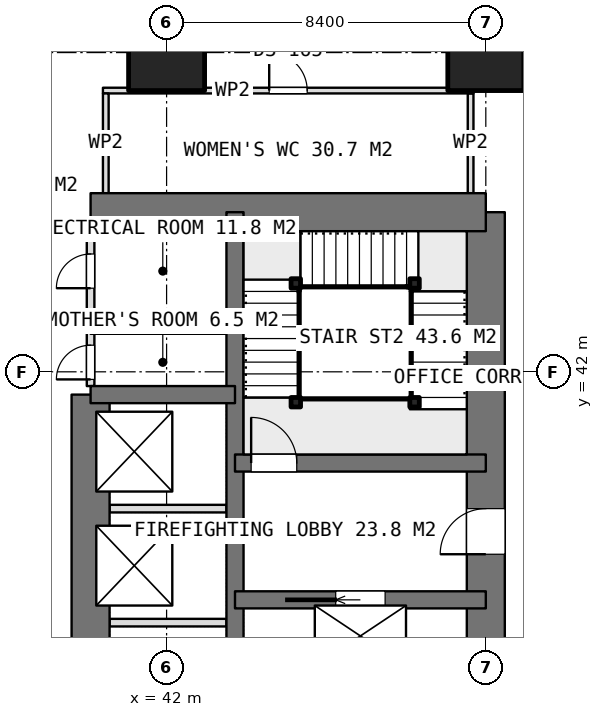
"""IFC4 building model, lengths in metres.
Left out: names, types, materials, properties, quantities, classifications, styles, units other than length and angle.
Written with IfcOpenShell. Run it as: python <this file> out.ifc"""

import sys

from ifc_helpers import new_model, si_unit, direction, frame, frame_2d, origin, origin_2d, place, context, subcontext, project, spatial, rectangle, extrude, element, fill, save


model = new_model("IFC4")
c1 = context("Model", 3, precision=1e-05, world=origin(), true_north=direction((0.0, 1.0)))
c2 = subcontext(c1, "Body", "Model", "MODEL_VIEW")
j1 = project(units=[si_unit("LENGTHUNIT", "METRE"), si_unit("PLANEANGLEUNIT", "RADIAN")], contexts=[c1])
p1 = place(None, origin())
s1 = spatial("IfcSite", under=j1, at=p1, CompositionType="ELEMENT")
p2 = place(p1, origin())
s2 = spatial("IfcBuilding", under=s1, at=p2, CompositionType="ELEMENT")
p3 = place(p2, frame((0.0, 0.0, 151.55)))
s3 = spatial("IfcBuildingStorey", under=s2, at=p3, CompositionType="ELEMENT", Elevation=151.55)
p4 = place(p3, frame((40.0, 46.2, 0.0), z_axis=(0.0, 0.0, 1.0), x_axis=(1.0, 0.0, 0.0)))
e1 = element("IfcWall", 1, at=p4, inside=s3, PredefinedType="SHEAR", context=c2, shape_type="SweptSolid", body=[
    extrude(rectangle(XDim=10.4, YDim=1.0, at=frame_2d((5.2, 0.0))), origin(), (0.0, 0.0, 1.0), 3.75),
])
p5 = place(p3, frame((50.4, 21.0, 0.0), z_axis=(0.0, 0.0, 1.0), x_axis=(0.0, 1.0, 0.0)))
e2 = element("IfcWall", 2, at=p5, inside=s3, PredefinedType="SHEAR", context=c2, shape_type="SweptSolid", body=[
    extrude(rectangle(XDim=25.2, YDim=1.0, at=frame_2d((12.6, 0.0))), origin(), (0.0, 0.0, 1.0), 3.75),
])
p6 = place(p5, frame((16.2, 0.0, 0.0)))
e3 = element("IfcOpeningElement", 3, at=p6, cuts=e2, PredefinedType="OPENING", context=c2, shape_type="SweptSolid", body=[
    extrude(rectangle(XDim=1.2, YDim=2.1, at=frame_2d((0.6, 1.05))), frame((0.0, 0.51, 0.0), z_axis=(0.0, -1.0, 0.0), x_axis=(1.0, 0.0, 0.0)), (0.0, 0.0, 1.0), 1.02),
])
p7 = place(p5, frame((10.05, 0.0, 0.0)))
e4 = element("IfcOpeningElement", 4, at=p7, cuts=e2, PredefinedType="OPENING", context=c2, shape_type="SweptSolid", body=[
    extrude(rectangle(XDim=0.9, YDim=2.1, at=frame_2d((0.45, 1.05))), frame((0.0, 0.51, 0.0), z_axis=(0.0, -1.0, 0.0), x_axis=(1.0, 0.0, 0.0)), (0.0, 0.0, 1.0), 1.02),
])
p8 = place(p5, frame((7.45, 0.0, 0.0)))
e5 = element("IfcOpeningElement", 5, at=p8, cuts=e2, PredefinedType="OPENING", context=c2, shape_type="SweptSolid", body=[
    extrude(rectangle(XDim=0.9, YDim=2.1, at=frame_2d((0.45, 1.05))), frame((0.0, 0.51, 0.0), z_axis=(0.0, -1.0, 0.0), x_axis=(1.0, 0.0, 0.0)), (0.0, 0.0, 1.0), 1.02),
])
p9 = place(p5, frame((0.7, 0.0, 0.0)))
e6 = element("IfcOpeningElement", 6, at=p9, cuts=e2, PredefinedType="OPENING", context=c2, shape_type="SweptSolid", body=[
    extrude(rectangle(XDim=1.2, YDim=2.1, at=frame_2d((0.6, 1.05))), frame((0.0, 0.51, 0.0), z_axis=(0.0, -1.0, 0.0), x_axis=(1.0, 0.0, 0.0)), (0.0, 0.0, 1.0), 1.02),
])
p10 = place(p3, frame((43.8, 21.0, 0.0), z_axis=(0.0, 0.0, 1.0), x_axis=(0.0, 1.0, 0.0)))
e7 = element("IfcWall", 7, at=p10, inside=s3, PredefinedType="SHEAR", context=c2, shape_type="SweptSolid", body=[
    extrude(rectangle(XDim=25.2, YDim=0.45, at=frame_2d((12.6, 0.0))), origin(), (0.0, 0.0, 1.0), 3.75),
])
p11 = place(p3, frame((40.0, 23.4, 0.0), z_axis=(0.0, 0.0, 1.0), x_axis=(0.0, 1.0, 0.0)))
e8 = element("IfcWall", 8, at=p11, inside=s3, PredefinedType="SHEAR", context=c2, shape_type="SweptSolid", body=[
    extrude(rectangle(XDim=18.0, YDim=1.0, at=frame_2d((9.0, 0.0))), origin(), (0.0, 0.0, 1.0), 3.75),
])
p12 = place(p11, frame((0.4, 0.0, 0.0)))
e9 = element("IfcOpeningElement", 9, at=p12, cuts=e8, PredefinedType="OPENING", context=c2, shape_type="SweptSolid", body=[
    extrude(rectangle(XDim=0.9, YDim=2.1, at=frame_2d((0.45, 1.05))), frame((0.0, 0.51, 0.0), z_axis=(0.0, -1.0, 0.0), x_axis=(1.0, 0.0, 0.0)), (0.0, 0.0, 1.0), 1.02),
])
p13 = place(p11, frame((3.35, 0.0, 0.0)))
e10 = element("IfcOpeningElement", 10, at=p13, cuts=e8, PredefinedType="OPENING", context=c2, shape_type="SweptSolid", body=[
    extrude(rectangle(XDim=1.0, YDim=2.1, at=frame_2d((0.5, 1.05))), frame((0.0, 0.51, 0.0), z_axis=(0.0, -1.0, 0.0), x_axis=(1.0, 0.0, 0.0)), (0.0, 0.0, 1.0), 1.02),
])
p14 = place(p3, frame((40.0, 41.4, 0.0), z_axis=(0.0, 0.0, 1.0), x_axis=(1.0, 0.0, 0.0)))
e11 = element("IfcWall", 11, at=p14, inside=s3, PredefinedType="SHEAR", context=c2, shape_type="SweptSolid", body=[
    extrude(rectangle(XDim=3.8, YDim=0.45, at=frame_2d((1.9, 0.0))), origin(), (0.0, 0.0, 1.0), 3.75),
])
p15 = place(p3, frame((43.8, 36.0, 0.0), z_axis=(0.0, 0.0, 1.0), x_axis=(1.0, 0.0, 0.0)))
e12 = element("IfcWall", 12, at=p15, inside=s3, PredefinedType="SHEAR", context=c2, shape_type="SweptSolid", body=[
    extrude(rectangle(XDim=6.6, YDim=0.45, at=frame_2d((3.3, 0.0))), origin(), (0.0, 0.0, 1.0), 3.75),
])
p16 = place(p15, frame((2.65, 0.0, 0.0)))
e13 = element("IfcOpeningElement", 13, at=p16, cuts=e12, PredefinedType="OPENING", context=c2, shape_type="SweptSolid", body=[
    extrude(rectangle(XDim=1.3, YDim=2.1, at=frame_2d((0.65, 1.05))), frame((0.0, 0.235, 0.0), z_axis=(0.0, -1.0, 0.0), x_axis=(1.0, 0.0, 0.0)), (0.0, 0.0, 1.0), 0.47),
])
p17 = place(p3, frame((43.8, 39.6, 0.0), z_axis=(0.0, 0.0, 1.0), x_axis=(1.0, 0.0, 0.0)))
e14 = element("IfcWall", 14, at=p17, inside=s3, PredefinedType="SHEAR", context=c2, shape_type="SweptSolid", body=[
    extrude(rectangle(XDim=6.6, YDim=0.45, at=frame_2d((3.3, 0.0))), origin(), (0.0, 0.0, 1.0), 3.75),
])
p18 = place(p17, frame((0.425, 0.0, 0.0)))
e15 = element("IfcOpeningElement", 15, at=p18, cuts=e14, PredefinedType="OPENING", context=c2, shape_type="SweptSolid", body=[
    extrude(rectangle(XDim=1.2, YDim=2.1, at=frame_2d((0.6, 1.05))), frame((0.0, 0.235, 0.0), z_axis=(0.0, -1.0, 0.0), x_axis=(1.0, 0.0, 0.0)), (0.0, 0.0, 1.0), 0.47),
])
for number, where, z_axis, x_axis in (
    (16, (42.0, 50.4, 0.0), (0.0, 0.0, 1.0), (1.0, 0.0, 0.0)),
    (17, (50.4, 50.4, 0.0), (0.0, 0.0, 1.0), (1.0, 0.0, 0.0)),
):
    element("IfcColumn", number, at=place(p3, frame(where, z_axis=z_axis, x_axis=x_axis)), inside=s3, PredefinedType="COLUMN", context=c2, shape_type="SweptSolid", body=[
        extrude(rectangle(XDim=2.0, YDim=2.0, at=origin_2d()), origin(), (0.0, 0.0, 1.0), 3.75),
    ])
for number, where, z_axis, x_axis in (
    (18, (40.5, 35.4, 0.0), (0.0, 0.0, 1.0), (1.0, 0.0, 0.0)),
    (19, (40.5, 38.4, 0.0), (0.0, 0.0, 1.0), (1.0, 0.0, 0.0)),
):
    element("IfcWall", number, at=place(p3, frame(where, z_axis=z_axis, x_axis=x_axis)), inside=s3, PredefinedType="PARTITIONING", context=c2, shape_type="SweptSolid", body=[
        extrude(rectangle(XDim=3.075, YDim=0.2, at=frame_2d((1.538, 0.0))), origin(), (0.0, 0.0, 1.0), 3.5),
    ])
p19 = place(p3, frame((40.0, 41.625, 0.0), z_axis=(0.0, 0.0, 1.0), x_axis=(0.0, 1.0, 0.0)))
e20 = element("IfcWall", 20, at=p19, inside=s3, PredefinedType="PARTITIONING", context=c2, shape_type="SweptSolid", body=[
    extrude(rectangle(XDim=4.075, YDim=0.2, at=frame_2d((2.038, 0.0))), origin(), (0.0, 0.0, 1.0), 3.5),
])
p20 = place(p19, frame((2.575, 0.0, 0.0)))
e21 = element("IfcOpeningElement", 21, at=p20, cuts=e20, PredefinedType="OPENING", context=c2, shape_type="SweptSolid", body=[
    extrude(rectangle(XDim=0.9, YDim=2.1, at=frame_2d((0.45, 1.05))), frame((0.0, 0.11, 0.0), z_axis=(0.0, -1.0, 0.0), x_axis=(1.0, 0.0, 0.0)), (0.0, 0.0, 1.0), 0.22),
])
p21 = place(p19, frame((0.175, 0.0, 0.0)))
e22 = element("IfcOpeningElement", 22, at=p21, cuts=e20, PredefinedType="OPENING", context=c2, shape_type="SweptSolid", body=[
    extrude(rectangle(XDim=0.9, YDim=2.1, at=frame_2d((0.45, 1.05))), frame((0.0, 0.11, 0.0), z_axis=(0.0, -1.0, 0.0), x_axis=(1.0, 0.0, 0.0)), (0.0, 0.0, 1.0), 0.22),
])
p22 = place(p3, frame((40.0, 43.1, 0.0), z_axis=(0.0, 0.0, 1.0), x_axis=(1.0, 0.0, 0.0)))
e23 = element("IfcWall", 23, at=p22, inside=s3, PredefinedType="PARTITIONING", context=c2, shape_type="SweptSolid", body=[
    extrude(rectangle(XDim=3.575, YDim=0.2, at=frame_2d((1.788, 0.0))), origin(), (0.0, 0.0, 1.0), 3.5),
])
p23 = place(p3, frame((40.325, 49.4, 0.0), z_axis=(0.0, 0.0, 1.0), x_axis=(1.0, 0.0, 0.0)))
e24 = element("IfcWall", 24, at=p23, inside=s3, PredefinedType="PARTITIONING", context=c2, shape_type="SweptSolid", body=[
    extrude(rectangle(XDim=9.75, YDim=0.15, at=frame_2d((4.875, 0.0))), origin(), (0.0, 0.0, 1.0), 3.5),
])
p24 = place(p23, frame((4.375, 0.0, 0.0)))
e25 = element("IfcOpeningElement", 25, at=p24, cuts=e24, PredefinedType="OPENING", context=c2, shape_type="SweptSolid", body=[
    extrude(rectangle(XDim=1.0, YDim=2.1, at=frame_2d((0.5, 1.05))), frame((0.0, 0.085, 0.0), z_axis=(0.0, -1.0, 0.0), x_axis=(1.0, 0.0, 0.0)), (0.0, 0.0, 1.0), 0.17),
])
for number, where, z_axis, x_axis in (
    (26, (40.4, 46.7, 0.0), (0.0, 0.0, 1.0), (0.0, 1.0, 0.0)),
    (27, (50.0, 46.7, 0.0), (0.0, 0.0, 1.0), (0.0, 1.0, 0.0)),
):
    element("IfcWall", number, at=place(p3, frame(where, z_axis=z_axis, x_axis=x_axis)), inside=s3, PredefinedType="PARTITIONING", context=c2, shape_type="SweptSolid", body=[
        extrude(rectangle(XDim=2.625, YDim=0.15, at=frame_2d((1.312, 0.0))), origin(), (0.0, 0.0, 1.0), 3.5),
    ])
for number, where, z_axis, x_axis in (
    (28, (45.4, 41.2, 0.0), (0.0, 0.0, 1.0), (1.0, 0.0, 0.0)),
    (29, (45.4, 44.325, 0.0), (0.0, 0.0, 1.0), (1.0, 0.0, 0.0)),
    (30, (48.525, 44.325, 0.0), (0.0, 0.0, 1.0), (1.0, 0.0, 0.0)),
    (31, (48.525, 41.2, 0.0), (0.0, 0.0, 1.0), (1.0, 0.0, 0.0)),
):
    element("IfcColumn", number, at=place(p3, frame(where, z_axis=z_axis, x_axis=x_axis)), inside=s3, PredefinedType="COLUMN", context=c2, shape_type="SweptSolid", body=[
        extrude(rectangle(XDim=0.25, YDim=0.25, at=origin_2d()), origin(), (0.0, 0.0, 1.0), 3.75),
    ])
p25 = place(p6, origin())
e32 = element("IfcDoor", 32, at=p25, inside=s3, OperationType="SINGLE_SWING_LEFT", PredefinedType="DOOR", context=c2, shape_type="SweptSolid", body=[
    extrude(rectangle(XDim=1.2, YDim=2.1, at=frame_2d((0.6, 1.05))), frame((0.0, 0.025, 0.0), z_axis=(0.0, -1.0, 0.0), x_axis=(1.0, 0.0, 0.0)), (0.0, 0.0, 1.0), 0.05),
])
fill(e3, e32)
p26 = place(p20, origin())
e33 = element("IfcDoor", 33, at=p26, inside=s3, OperationType="SINGLE_SWING_LEFT", PredefinedType="DOOR", context=c2, shape_type="SweptSolid", body=[
    extrude(rectangle(XDim=0.9, YDim=2.1, at=frame_2d((0.45, 1.05))), frame((0.0, 0.025, 0.0), z_axis=(0.0, -1.0, 0.0), x_axis=(1.0, 0.0, 0.0)), (0.0, 0.0, 1.0), 0.05),
])
fill(e21, e33)
p27 = place(p21, origin())
e34 = element("IfcDoor", 34, at=p27, inside=s3, OperationType="SINGLE_SWING_LEFT", PredefinedType="DOOR", context=c2, shape_type="SweptSolid", body=[
    extrude(rectangle(XDim=0.9, YDim=2.1, at=frame_2d((0.45, 1.05))), frame((0.0, 0.025, 0.0), z_axis=(0.0, -1.0, 0.0), x_axis=(1.0, 0.0, 0.0)), (0.0, 0.0, 1.0), 0.05),
])
fill(e22, e34)
p28 = place(p16, origin())
e35 = element("IfcDoor", 35, at=p28, inside=s3, OperationType="SLIDING_TO_LEFT", PredefinedType="USERDEFINED", context=c2, shape_type="SweptSolid", body=[
    extrude(rectangle(XDim=1.3, YDim=2.1, at=frame_2d((0.65, 1.05))), frame((0.0, 0.025, 0.0), z_axis=(0.0, -1.0, 0.0), x_axis=(1.0, 0.0, 0.0)), (0.0, 0.0, 1.0), 0.05),
])
fill(e13, e35)
p29 = place(p24, origin())
e36 = element("IfcDoor", 36, at=p29, inside=s3, OperationType="SINGLE_SWING_LEFT", PredefinedType="DOOR", context=c2, shape_type="SweptSolid", body=[
    extrude(rectangle(XDim=1.0, YDim=2.1, at=frame_2d((0.5, 1.05))), frame((0.0, 0.025, 0.0), z_axis=(0.0, -1.0, 0.0), x_axis=(1.0, 0.0, 0.0)), (0.0, 0.0, 1.0), 0.05),
])
fill(e25, e36)
p30 = place(p18, origin())
e37 = element("IfcDoor", 37, at=p30, inside=s3, OperationType="SINGLE_SWING_RIGHT", PredefinedType="DOOR", context=c2, shape_type="SweptSolid", body=[
    extrude(rectangle(XDim=1.2, YDim=2.1, at=frame_2d((0.6, 1.05))), frame((0.0, 0.025, 0.0), z_axis=(0.0, -1.0, 0.0), x_axis=(1.0, 0.0, 0.0)), (0.0, 0.0, 1.0), 0.05),
])
fill(e15, e37)
save(model, sys.argv[1])
